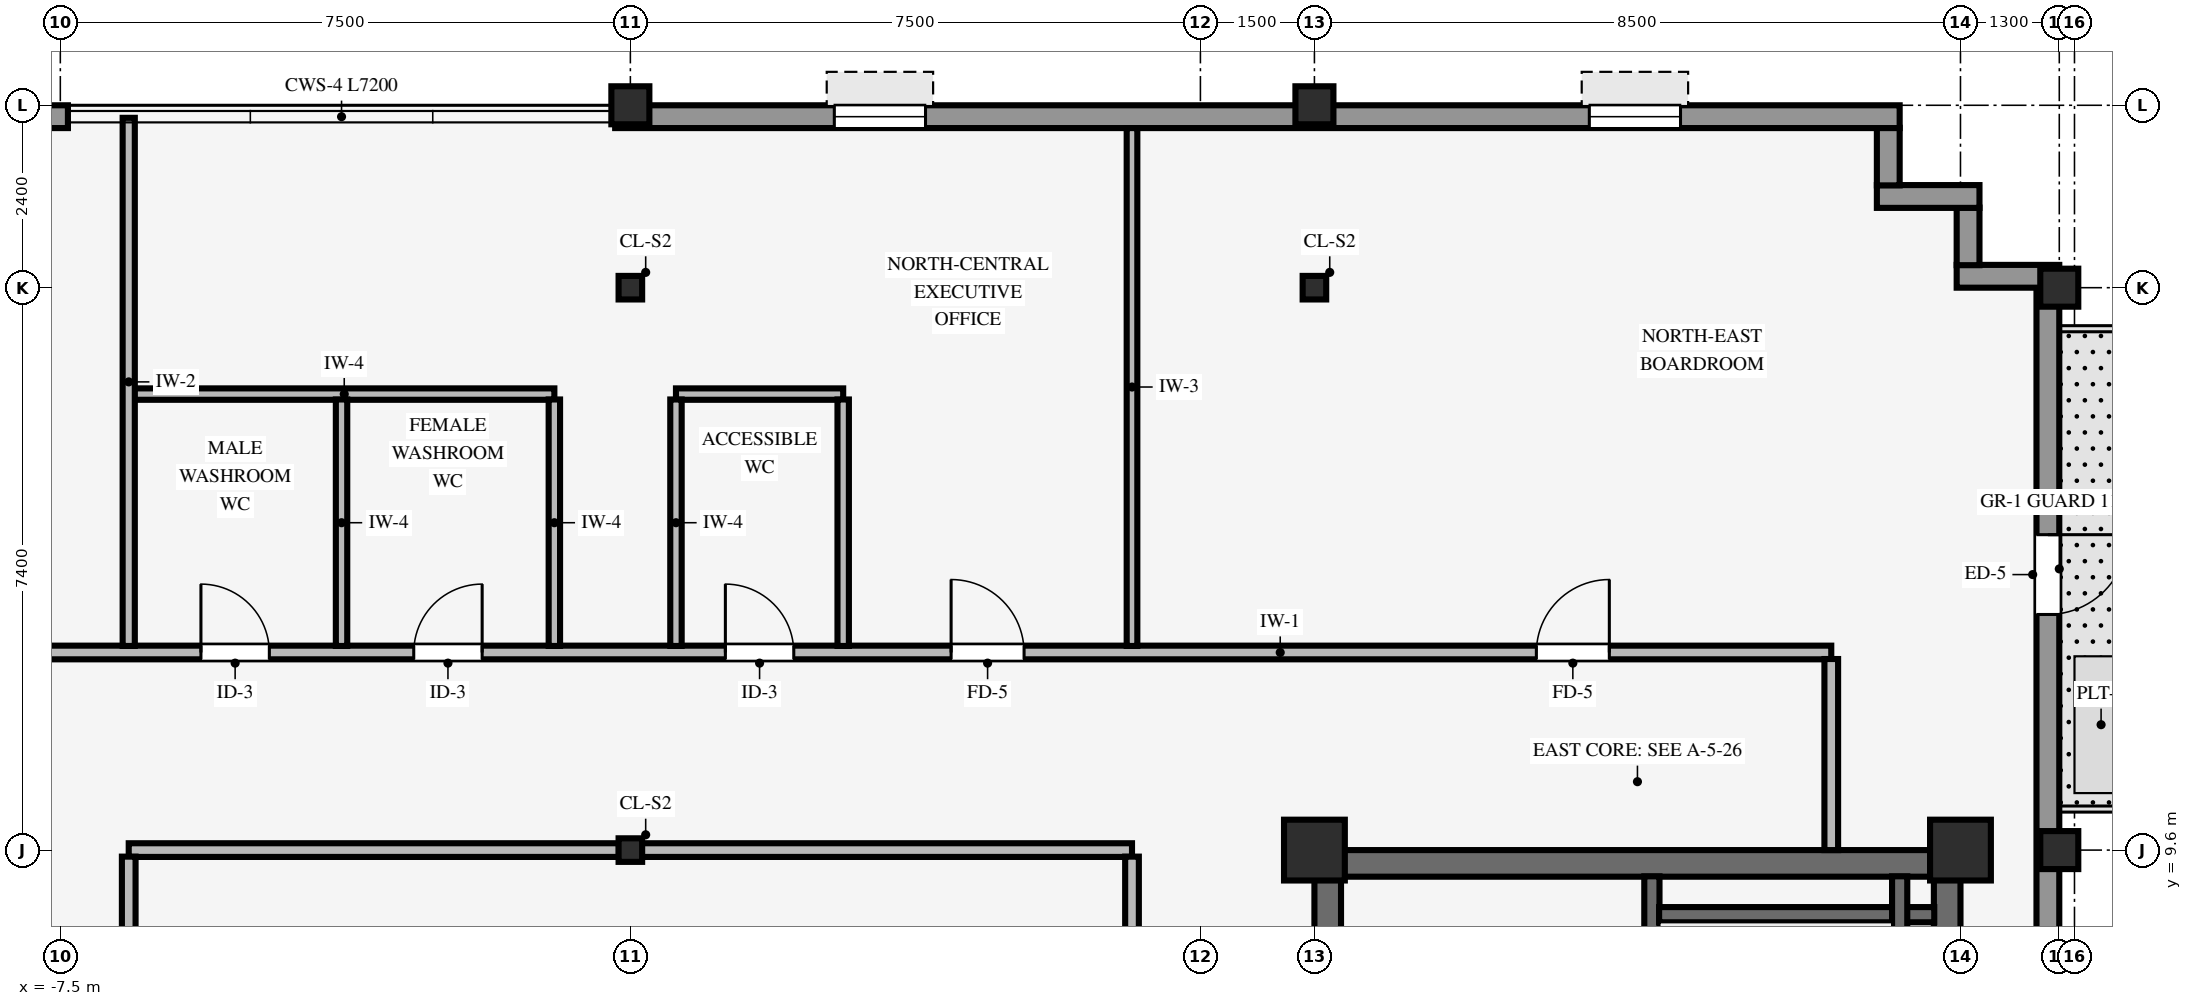
"""IFC4 building model, lengths in metres.
Left out: names, types, materials, properties, quantities, classifications, styles, units other than length and angle.
Written with IfcOpenShell. Run it as: python <this file> out.ifc"""

import sys

from ifc_helpers import new_model, si_unit, direction, frame, frame_2d, origin, origin_2d, place, context, subcontext, project, spatial, rectangle, hollow_rectangle, i_section, extrude, source, transform, mapped, element, fill, save


model = new_model("IFC4")
c1 = context("Model", 3, precision=1e-05, world=origin(), true_north=direction((0.0, 1.0)))
c2 = subcontext(c1, "Body", "Model", "MODEL_VIEW")
j1 = project(units=[si_unit("LENGTHUNIT", "METRE"), si_unit("PLANEANGLEUNIT", "RADIAN")], contexts=[c1])
p1 = place(None, origin())
s1 = spatial("IfcSite", under=j1, at=p1, CompositionType="ELEMENT")
p2 = place(p1, origin())
s2 = spatial("IfcBuilding", under=s1, at=p2, CompositionType="ELEMENT")
p3 = place(p2, frame((0.0, 0.0, 227.4)))
s3 = spatial("IfcBuildingStorey", under=s2, at=p3, CompositionType="ELEMENT", Elevation=227.4)
p4 = place(p3, frame((9.0, 9.425, 0.0), z_axis=(0.0, 0.0, 1.0), x_axis=(1.0, 0.0, 0.0)))
e1 = element("IfcWall", 1, at=p4, inside=s3, PredefinedType="SHEAR", context=c2, shape_type="SweptSolid", body=[
    extrude(rectangle(XDim=8.5, YDim=0.35, at=frame_2d((4.25, 0.0))), origin(), (0.0, 0.0, 1.0), 3.37),
])
p5 = place(p3, frame((9.175, -9.255, 0.0), z_axis=(0.0, 0.0, 1.0), x_axis=(0.0, 1.0, 0.0)))
e2 = element("IfcWall", 2, at=p5, inside=s3, PredefinedType="SHEAR", context=c2, shape_type="SweptSolid", body=[
    extrude(rectangle(XDim=18.51, YDim=0.35, at=frame_2d((9.255, 0.0))), origin(), (0.0, 0.0, 1.0), 3.37),
])
p6 = place(p5, frame((8.655, 0.0, 0.0)))
e3 = element("IfcOpeningElement", 3, at=p6, cuts=e2, PredefinedType="OPENING", context=c2, shape_type="SweptSolid", body=[
    extrude(rectangle(XDim=1.2, YDim=2.15, at=frame_2d((0.6, 1.075))), frame((0.0, 0.185, 0.0), z_axis=(0.0, -1.0, 0.0), x_axis=(1.0, 0.0, 0.0)), (0.0, 0.0, 1.0), 0.37),
])
p7 = place(p3, frame((17.325, -9.255, 0.0), z_axis=(0.0, 0.0, 1.0), x_axis=(0.0, 1.0, 0.0)))
e4 = element("IfcWall", 4, at=p7, inside=s3, PredefinedType="SHEAR", context=c2, shape_type="SweptSolid", body=[
    extrude(rectangle(XDim=18.51, YDim=0.35, at=frame_2d((9.255, 0.0))), origin(), (0.0, 0.0, 1.0), 3.37),
])
for number, where, z_axis, x_axis in (
    (5, (9.0, 9.6, 0.0), (0.0, 0.0, 1.0), (1.0, 0.0, 0.0)),
    (6, (17.5, 9.6, 0.0), (0.0, 0.0, 1.0), (1.0, 0.0, 0.0)),
):
    element("IfcColumn", number, at=place(p3, frame(where, z_axis=z_axis, x_axis=x_axis)), inside=s3, PredefinedType="COLUMN", context=c2, shape_type="SweptSolid", body=[
        extrude(rectangle(XDim=0.8, YDim=0.8, at=origin_2d()), origin(), (0.0, 0.0, 1.0), 3.37),
    ])
for number, where, z_axis, x_axis in (
    (7, (18.8, 9.6, 0.0), (0.0, 0.0, 1.0), (1.0, 0.0, 0.0)),
    (8, (18.8, 17.0, 0.0), (0.0, 0.0, 1.0), (1.0, 0.0, 0.0)),
    (9, (0.0, 19.4, 0.0), (0.0, 0.0, 1.0), (1.0, 0.0, 0.0)),
    (10, (9.0, 19.4, 0.0), (0.0, 0.0, 1.0), (1.0, 0.0, 0.0)),
):
    element("IfcColumn", number, at=place(p3, frame(where, z_axis=z_axis, x_axis=x_axis)), inside=s3, PredefinedType="COLUMN", context=c2, shape_type="SweptSolid", body=[
        extrude(hollow_rectangle(XDim=0.5, YDim=0.5, WallThickness=0.032, InnerFilletRadius=0.032, OuterFilletRadius=0.064, at=origin_2d()), origin(), (0.0, 0.0, 1.0), 3.37),
    ])
for number, where, z_axis, x_axis in (
    (11, (0.0, 9.6, 0.0), (0.0, 0.0, 1.0), (1.0, 0.0, 0.0)),
    (12, (0.0, 17.0, 0.0), (0.0, 0.0, 1.0), (1.0, 0.0, 0.0)),
    (13, (9.0, 17.0, 0.0), (0.0, 0.0, 1.0), (1.0, 0.0, 0.0)),
):
    element("IfcColumn", number, at=place(p3, frame(where, z_axis=z_axis, x_axis=x_axis)), inside=s3, PredefinedType="COLUMN", context=c2, shape_type="SweptSolid", body=[
        extrude(i_section(OverallWidth=0.31, OverallDepth=0.31, WebThickness=0.015, FlangeThickness=0.015, FilletRadius=0.015, at=origin_2d()), origin(), (0.0, 0.0, 1.0), 3.37),
    ])
p8 = place(p3, frame((18.65, -17.004, 0.0), z_axis=(0.0, 0.0, 1.0), x_axis=(0.0, 1.0, 0.0)))
e14 = element("IfcWall", 14, at=p8, inside=s3, PredefinedType="STANDARD", context=c2, shape_type="SweptSolid", body=[
    extrude(rectangle(XDim=34.008, YDim=0.3, at=frame_2d((17.004, 0.0))), origin(), (0.0, 0.0, 1.0), 2.705),
])
p9 = place(p8, frame((30.754, 0.0, 0.0), z_axis=(0.0, 0.0, 1.0), x_axis=(-1.0, 0.0, 0.0)))
e15 = element("IfcOpeningElement", 15, at=p9, cuts=e14, PredefinedType="OPENING", context=c2, shape_type="SweptSolid", body=[
    extrude(rectangle(XDim=1.05, YDim=2.1, at=frame_2d((0.525, 1.05))), frame((0.0, 0.16, 0.0), z_axis=(0.0, -1.0, 0.0), x_axis=(1.0, 0.0, 0.0)), (0.0, 0.0, 1.0), 0.32),
])
p10 = place(p8, frame((2.311, 0.0, 0.8)))
e16 = element("IfcOpeningElement", 16, at=p10, cuts=e14, PredefinedType="OPENING", context=c2, shape_type="SweptSolid", body=[
    extrude(rectangle(XDim=1.95, YDim=1.48, at=frame_2d((0.975, 0.74))), frame((0.0, 0.16, 0.0), z_axis=(0.0, -1.0, 0.0), x_axis=(1.0, 0.0, 0.0)), (0.0, 0.0, 1.0), 0.32),
])
p11 = place(p3, frame((17.45, 17.15, 0.0), z_axis=(0.0, 0.0, 1.0), x_axis=(1.0, 0.0, 0.0)))
e17 = element("IfcWall", 17, at=p11, inside=s3, PredefinedType="STANDARD", context=c2, shape_type="SweptSolid", body=[
    extrude(rectangle(XDim=1.35, YDim=0.3, at=frame_2d((0.675, 0.0))), origin(), (0.0, 0.0, 1.0), 2.892),
])
p12 = place(p3, frame((17.6, 17.296, 0.0), z_axis=(0.0, 0.0, 1.0), x_axis=(0.0, 1.0, 0.0)))
e18 = element("IfcWall", 18, at=p12, inside=s3, PredefinedType="STANDARD", context=c2, shape_type="SweptSolid", body=[
    extrude(rectangle(XDim=0.758, YDim=0.3, at=frame_2d((0.379, 0.0))), origin(), (0.0, 0.0, 1.0), 2.892),
])
p13 = place(p3, frame((16.4, 18.2, 0.0), z_axis=(0.0, 0.0, 1.0), x_axis=(1.0, 0.0, 0.0)))
e19 = element("IfcWall", 19, at=p13, inside=s3, PredefinedType="STANDARD", context=c2, shape_type="SweptSolid", body=[
    extrude(rectangle(XDim=1.35, YDim=0.3, at=frame_2d((0.675, 0.0))), origin(), (0.0, 0.0, 1.0), 2.892),
])
p14 = place(p3, frame((16.55, 18.346, 0.0), z_axis=(0.0, 0.0, 1.0), x_axis=(0.0, 1.0, 0.0)))
e20 = element("IfcWall", 20, at=p14, inside=s3, PredefinedType="STANDARD", context=c2, shape_type="SweptSolid", body=[
    extrude(rectangle(XDim=0.758, YDim=0.3, at=frame_2d((0.379, 0.0))), origin(), (0.0, 0.0, 1.0), 2.892),
])
p15 = place(p3, frame((-24.3, 19.25, 0.0), z_axis=(0.0, 0.0, 1.0), x_axis=(1.0, 0.0, 0.0)))
e21 = element("IfcWall", 21, at=p15, inside=s3, PredefinedType="STANDARD", context=c2, shape_type="SweptSolid", body=[
    extrude(rectangle(XDim=16.9, YDim=0.3, at=frame_2d((8.45, 0.0))), origin(), (0.0, 0.0, 1.0), 2.705),
])
p16 = place(p15, frame((2.883, 0.0, 0.8)))
e22 = element("IfcOpeningElement", 22, at=p16, cuts=e21, PredefinedType="OPENING", context=c2, shape_type="SweptSolid", body=[
    extrude(rectangle(XDim=1.2, YDim=1.48, at=frame_2d((0.6, 0.74))), frame((0.0, 0.16, 0.0), z_axis=(0.0, -1.0, 0.0), x_axis=(1.0, 0.0, 0.0)), (0.0, 0.0, 1.0), 0.32),
])
p17 = place(p15, frame((7.85, 0.0, 0.8)))
e23 = element("IfcOpeningElement", 23, at=p17, cuts=e21, PredefinedType="OPENING", context=c2, shape_type="SweptSolid", body=[
    extrude(rectangle(XDim=1.2, YDim=1.48, at=frame_2d((0.6, 0.74))), frame((0.0, 0.16, 0.0), z_axis=(0.0, -1.0, 0.0), x_axis=(1.0, 0.0, 0.0)), (0.0, 0.0, 1.0), 0.32),
])
p18 = place(p15, frame((12.817, 0.0, 0.8)))
e24 = element("IfcOpeningElement", 24, at=p18, cuts=e21, PredefinedType="OPENING", context=c2, shape_type="SweptSolid", body=[
    extrude(rectangle(XDim=1.2, YDim=1.48, at=frame_2d((0.6, 0.74))), frame((0.0, 0.16, 0.0), z_axis=(0.0, -1.0, 0.0), x_axis=(1.0, 0.0, 0.0)), (0.0, 0.0, 1.0), 0.32),
])
p19 = place(p3, frame((-0.2, 19.25, 0.0), z_axis=(0.0, 0.0, 1.0), x_axis=(1.0, 0.0, 0.0)))
e25 = element("IfcWall", 25, at=p19, inside=s3, PredefinedType="STANDARD", context=c2, shape_type="SweptSolid", body=[
    extrude(rectangle(XDim=16.9, YDim=0.3, at=frame_2d((8.45, 0.0))), origin(), (0.0, 0.0, 1.0), 2.705),
])
p20 = place(p19, frame((2.883, 0.0, 0.8)))
e26 = element("IfcOpeningElement", 26, at=p20, cuts=e25, PredefinedType="OPENING", context=c2, shape_type="SweptSolid", body=[
    extrude(rectangle(XDim=1.2, YDim=1.48, at=frame_2d((0.6, 0.74))), frame((0.0, 0.16, 0.0), z_axis=(0.0, -1.0, 0.0), x_axis=(1.0, 0.0, 0.0)), (0.0, 0.0, 1.0), 0.32),
])
p21 = place(p19, frame((12.817, 0.0, 0.8)))
e27 = element("IfcOpeningElement", 27, at=p21, cuts=e25, PredefinedType="OPENING", context=c2, shape_type="SweptSolid", body=[
    extrude(rectangle(XDim=1.2, YDim=1.48, at=frame_2d((0.6, 0.74))), frame((0.0, 0.16, 0.0), z_axis=(0.0, -1.0, 0.0), x_axis=(1.0, 0.0, 0.0)), (0.0, 0.0, 1.0), 0.32),
])
p22 = place(p3, frame((13.44, 0.9, 0.0), z_axis=(0.0, 0.0, 1.0), x_axis=(0.0, 1.0, 0.0)))
e28 = element("IfcWall", 28, at=p22, inside=s3, PredefinedType="SHEAR", context=c2, shape_type="SweptSolid", body=[
    extrude(rectangle(XDim=8.355, YDim=0.2, at=frame_2d((4.177, 0.0))), origin(), (0.0, 0.0, 1.0), 3.37),
])
p23 = place(p22, frame((0.43, 0.0, 0.0)))
e29 = element("IfcOpeningElement", 29, at=p23, cuts=e28, PredefinedType="OPENING", context=c2, shape_type="SweptSolid", body=[
    extrude(rectangle(XDim=1.1, YDim=2.15, at=frame_2d((0.55, 1.075))), frame((0.0, 0.11, 0.0), z_axis=(0.0, -1.0, 0.0), x_axis=(1.0, 0.0, 0.0)), (0.0, 0.0, 1.0), 0.22),
])
p24 = place(p3, frame((13.535, 8.75, 0.0), z_axis=(0.0, 0.0, 1.0), x_axis=(1.0, 0.0, 0.0)))
e30 = element("IfcWall", 30, at=p24, inside=s3, PredefinedType="SHEAR", context=c2, shape_type="SweptSolid", body=[
    extrude(rectangle(XDim=3.62, YDim=0.2, at=frame_2d((1.81, 0.0))), origin(), (0.0, 0.0, 1.0), 3.37),
])
p25 = place(p3, frame((16.7, 1.095, 0.0), z_axis=(0.0, 0.0, 1.0), x_axis=(0.0, 1.0, 0.0)))
e31 = element("IfcWall", 31, at=p25, inside=s3, PredefinedType="SHEAR", context=c2, shape_type="SweptSolid", body=[
    extrude(rectangle(XDim=8.16, YDim=0.2, at=frame_2d((4.08, 0.0))), origin(), (0.0, 0.0, 1.0), 3.37),
])
for number, where, z_axis, x_axis in (
    (32, (-6.6, 9.6, 0.0), (0.0, 0.0, 1.0), (1.0, 0.0, 0.0)),
    (33, (0.151, 9.6, 0.0), (0.0, 0.0, 1.0), (1.0, 0.0, 0.0)),
):
    element("IfcWall", number, at=place(p3, frame(where, z_axis=z_axis, x_axis=x_axis)), inside=s3, PredefinedType="PARTITIONING", context=c2, shape_type="SweptSolid", body=[
        extrude(rectangle(XDim=6.449, YDim=0.18, at=frame_2d((3.225, 0.0))), origin(), (0.0, 0.0, 1.0), 2.405),
    ])
p26 = place(p3, frame((-15.0, 12.2, 0.0), z_axis=(0.0, 0.0, 1.0), x_axis=(1.0, 0.0, 0.0)))
e34 = element("IfcWall", 34, at=p26, inside=s3, PredefinedType="PARTITIONING", context=c2, shape_type="SweptSolid", body=[
    extrude(rectangle(XDim=30.8, YDim=0.18, at=frame_2d((15.4, 0.0))), origin(), (0.0, 0.0, 1.0), 3.36),
])
p27 = place(p26, frame((26.92, 0.0, 0.0)))
e35 = element("IfcOpeningElement", 35, at=p27, cuts=e34, PredefinedType="OPENING", context=c2, shape_type="SweptSolid", body=[
    extrude(rectangle(XDim=0.96, YDim=2.1, at=frame_2d((0.48, 1.05))), frame((0.0, 0.1, 0.0), z_axis=(0.0, -1.0, 0.0), x_axis=(1.0, 0.0, 0.0)), (0.0, 0.0, 1.0), 0.2),
])
p28 = place(p26, frame((2.52, 0.0, 0.0)))
e36 = element("IfcOpeningElement", 36, at=p28, cuts=e34, PredefinedType="OPENING", context=c2, shape_type="SweptSolid", body=[
    extrude(rectangle(XDim=0.96, YDim=2.1, at=frame_2d((0.48, 1.05))), frame((0.0, 0.1, 0.0), z_axis=(0.0, -1.0, 0.0), x_axis=(1.0, 0.0, 0.0)), (0.0, 0.0, 1.0), 0.2),
])
p29 = place(p26, frame((19.22, 0.0, 0.0)))
e37 = element("IfcOpeningElement", 37, at=p29, cuts=e34, PredefinedType="OPENING", context=c2, shape_type="SweptSolid", body=[
    extrude(rectangle(XDim=0.96, YDim=2.1, at=frame_2d((0.48, 1.05))), frame((0.0, 0.1, 0.0), z_axis=(0.0, -1.0, 0.0), x_axis=(1.0, 0.0, 0.0)), (0.0, 0.0, 1.0), 0.2),
])
p30 = place(p26, frame((9.35, 0.0, 0.0)))
e38 = element("IfcOpeningElement", 38, at=p30, cuts=e34, PredefinedType="OPENING", context=c2, shape_type="SweptSolid", body=[
    extrude(rectangle(XDim=0.9, YDim=2.1, at=frame_2d((0.45, 1.05))), frame((0.0, 0.1, 0.0), z_axis=(0.0, -1.0, 0.0), x_axis=(1.0, 0.0, 0.0)), (0.0, 0.0, 1.0), 0.2),
])
p31 = place(p26, frame((12.15, 0.0, 0.0)))
e39 = element("IfcOpeningElement", 39, at=p31, cuts=e34, PredefinedType="OPENING", context=c2, shape_type="SweptSolid", body=[
    extrude(rectangle(XDim=0.9, YDim=2.1, at=frame_2d((0.45, 1.05))), frame((0.0, 0.1, 0.0), z_axis=(0.0, -1.0, 0.0), x_axis=(1.0, 0.0, 0.0)), (0.0, 0.0, 1.0), 0.2),
])
p32 = place(p26, frame((16.25, 0.0, 0.0)))
e40 = element("IfcOpeningElement", 40, at=p32, cuts=e34, PredefinedType="OPENING", context=c2, shape_type="SweptSolid", body=[
    extrude(rectangle(XDim=0.9, YDim=2.1, at=frame_2d((0.45, 1.05))), frame((0.0, 0.1, 0.0), z_axis=(0.0, -1.0, 0.0), x_axis=(1.0, 0.0, 0.0)), (0.0, 0.0, 1.0), 0.2),
])
p33 = place(p3, frame((-6.529, 15.6, 0.0), z_axis=(0.0, 0.0, 1.0), x_axis=(1.0, 0.0, 0.0)))
e41 = element("IfcWall", 41, at=p33, inside=s3, PredefinedType="PARTITIONING", context=c2, shape_type="SweptSolid", body=[
    extrude(rectangle(XDim=5.529, YDim=0.15, at=frame_2d((2.765, 0.0))), origin(), (0.0, 0.0, 1.0), 3.36),
])
p34 = place(p3, frame((0.6, 15.6, 0.0), z_axis=(0.0, 0.0, 1.0), x_axis=(1.0, 0.0, 0.0)))
e42 = element("IfcWall", 42, at=p34, inside=s3, PredefinedType="PARTITIONING", context=c2, shape_type="SweptSolid", body=[
    extrude(rectangle(XDim=2.2, YDim=0.15, at=frame_2d((1.1, 0.0))), origin(), (0.0, 0.0, 1.0), 3.36),
])
p35 = place(p3, frame((-6.6, 1.336, 0.0), z_axis=(0.0, 0.0, 1.0), x_axis=(0.0, 1.0, 0.0)))
e43 = element("IfcWall", 43, at=p35, inside=s3, PredefinedType="PARTITIONING", context=c2, shape_type="SweptSolid", body=[
    extrude(rectangle(XDim=8.178, YDim=0.18, at=frame_2d((4.089, 0.0))), origin(), (0.0, 0.0, 1.0), 3.36),
])
p36 = place(p3, frame((-6.6, 12.286, 0.0), z_axis=(0.0, 0.0, 1.0), x_axis=(0.0, 1.0, 0.0)))
e44 = element("IfcWall", 44, at=p36, inside=s3, PredefinedType="PARTITIONING", context=c2, shape_type="SweptSolid", body=[
    extrude(rectangle(XDim=6.949, YDim=0.16, at=frame_2d((3.475, 0.0))), origin(), (0.0, 0.0, 1.0), 3.36),
])
for number, where, z_axis, x_axis in (
    (45, (-3.8, 12.286, 0.0), (0.0, 0.0, 1.0), (0.0, 1.0, 0.0)),
    (46, (-1.0, 12.286, 0.0), (0.0, 0.0, 1.0), (0.0, 1.0, 0.0)),
    (47, (0.6, 12.286, 0.0), (0.0, 0.0, 1.0), (0.0, 1.0, 0.0)),
    (48, (2.8, 12.286, 0.0), (0.0, 0.0, 1.0), (0.0, 1.0, 0.0)),
):
    element("IfcWall", number, at=place(p3, frame(where, z_axis=z_axis, x_axis=x_axis)), inside=s3, PredefinedType="PARTITIONING", context=c2, shape_type="SweptSolid", body=[
        extrude(rectangle(XDim=3.243, YDim=0.15, at=frame_2d((1.622, 0.0))), origin(), (0.0, 0.0, 1.0), 3.36),
    ])
p37 = place(p3, frame((6.6, 1.336, 0.0), z_axis=(0.0, 0.0, 1.0), x_axis=(0.0, 1.0, 0.0)))
e49 = element("IfcWall", 49, at=p37, inside=s3, PredefinedType="PARTITIONING", context=c2, shape_type="SweptSolid", body=[
    extrude(rectangle(XDim=8.178, YDim=0.18, at=frame_2d((4.089, 0.0))), origin(), (0.0, 0.0, 1.0), 3.36),
])
p38 = place(p3, frame((6.6, 12.286, 0.0), z_axis=(0.0, 0.0, 1.0), x_axis=(0.0, 1.0, 0.0)))
e50 = element("IfcWall", 50, at=p38, inside=s3, PredefinedType="PARTITIONING", context=c2, shape_type="SweptSolid", body=[
    extrude(rectangle(XDim=6.814, YDim=0.14, at=frame_2d((3.407, 0.0))), origin(), (0.0, 0.0, 1.0), 3.36),
])
p39 = place(p3, frame((15.8, 9.6, 0.0), z_axis=(0.0, 0.0, 1.0), x_axis=(0.0, 1.0, 0.0)))
e51 = element("IfcWall", 51, at=p39, inside=s3, PredefinedType="PARTITIONING", context=c2, shape_type="SweptSolid", body=[
    extrude(rectangle(XDim=2.514, YDim=0.18, at=frame_2d((1.257, 0.0))), origin(), (0.0, 0.0, 1.0), 3.36),
])
m1 = source(origin(), c2, "Body", "SweptSolid", [
    extrude(rectangle(XDim=1.05, YDim=2.1, at=frame_2d((0.525, 1.05))), frame((0.0, 0.025, 0.0), z_axis=(0.0, -1.0, 0.0), x_axis=(1.0, 0.0, 0.0)), (0.0, 0.0, 1.0), 0.05),
])
p40 = place(p9, origin())
e52 = element("IfcDoor", 52, at=p40, inside=s3, OperationType="SINGLE_SWING_LEFT", PredefinedType="DOOR", context=c2, shape_type="MappedRepresentation", body=[
    mapped(m1, transform((0.0, 0.0, 0.0), scale=1.0)),
])
fill(e15, e52)
m2 = source(origin(), c2, "Body", "SweptSolid", [
    extrude(rectangle(XDim=1.2, YDim=1.48, at=frame_2d((0.6, 0.74))), frame((0.0, 0.03, 0.0), z_axis=(0.0, -1.0, 0.0), x_axis=(1.0, 0.0, 0.0)), (0.0, 0.0, 1.0), 0.06),
])
p41 = place(p20, origin())
e53 = element("IfcWindow", 53, at=p41, inside=s3, PartitioningType="SINGLE_PANEL", PredefinedType="WINDOW", context=c2, shape_type="MappedRepresentation", body=[
    mapped(m2, transform((0.0, 0.0, 0.0), scale=1.0)),
])
fill(e26, e53)
p42 = place(p21, origin())
e54 = element("IfcWindow", 54, at=p42, inside=s3, PartitioningType="SINGLE_PANEL", PredefinedType="WINDOW", context=c2, shape_type="MappedRepresentation", body=[
    mapped(m2, transform((0.0, 0.0, 0.0), scale=1.0)),
])
fill(e27, e54)
m3 = source(origin(), c2, "Body", "SweptSolid", [
    extrude(rectangle(XDim=0.96, YDim=2.1, at=frame_2d((0.48, 1.05))), frame((0.0, 0.025, 0.0), z_axis=(0.0, -1.0, 0.0), x_axis=(1.0, 0.0, 0.0)), (0.0, 0.0, 1.0), 0.05),
])
p43 = place(p27, origin())
e55 = element("IfcDoor", 55, at=p43, inside=s3, OperationType="SINGLE_SWING_RIGHT", PredefinedType="DOOR", context=c2, shape_type="MappedRepresentation", body=[
    mapped(m3, transform((0.0, 0.0, 0.0), scale=1.0)),
])
fill(e35, e55)
p44 = place(p29, origin())
e56 = element("IfcDoor", 56, at=p44, inside=s3, OperationType="SINGLE_SWING_LEFT", PredefinedType="DOOR", context=c2, shape_type="MappedRepresentation", body=[
    mapped(m3, transform((0.0, 0.0, 0.0), scale=1.0)),
])
fill(e37, e56)
m4 = source(origin(), c2, "Body", "SweptSolid", [
    extrude(rectangle(XDim=0.9, YDim=2.1, at=frame_2d((0.45, 1.05))), frame((0.0, 0.025, 0.0), z_axis=(0.0, -1.0, 0.0), x_axis=(1.0, 0.0, 0.0)), (0.0, 0.0, 1.0), 0.05),
])
p45 = place(p30, origin())
e57 = element("IfcDoor", 57, at=p45, inside=s3, OperationType="SINGLE_SWING_LEFT", PredefinedType="DOOR", context=c2, shape_type="MappedRepresentation", body=[
    mapped(m4, transform((0.0, 0.0, 0.0), scale=1.0)),
])
fill(e38, e57)
p46 = place(p31, origin())
e58 = element("IfcDoor", 58, at=p46, inside=s3, OperationType="SINGLE_SWING_RIGHT", PredefinedType="DOOR", context=c2, shape_type="MappedRepresentation", body=[
    mapped(m4, transform((0.0, 0.0, 0.0), scale=1.0)),
])
fill(e39, e58)
p47 = place(p32, origin())
e59 = element("IfcDoor", 59, at=p47, inside=s3, OperationType="SINGLE_SWING_LEFT", PredefinedType="DOOR", context=c2, shape_type="MappedRepresentation", body=[
    mapped(m4, transform((0.0, 0.0, 0.0), scale=1.0)),
])
fill(e40, e59)
save(model, sys.argv[1])
